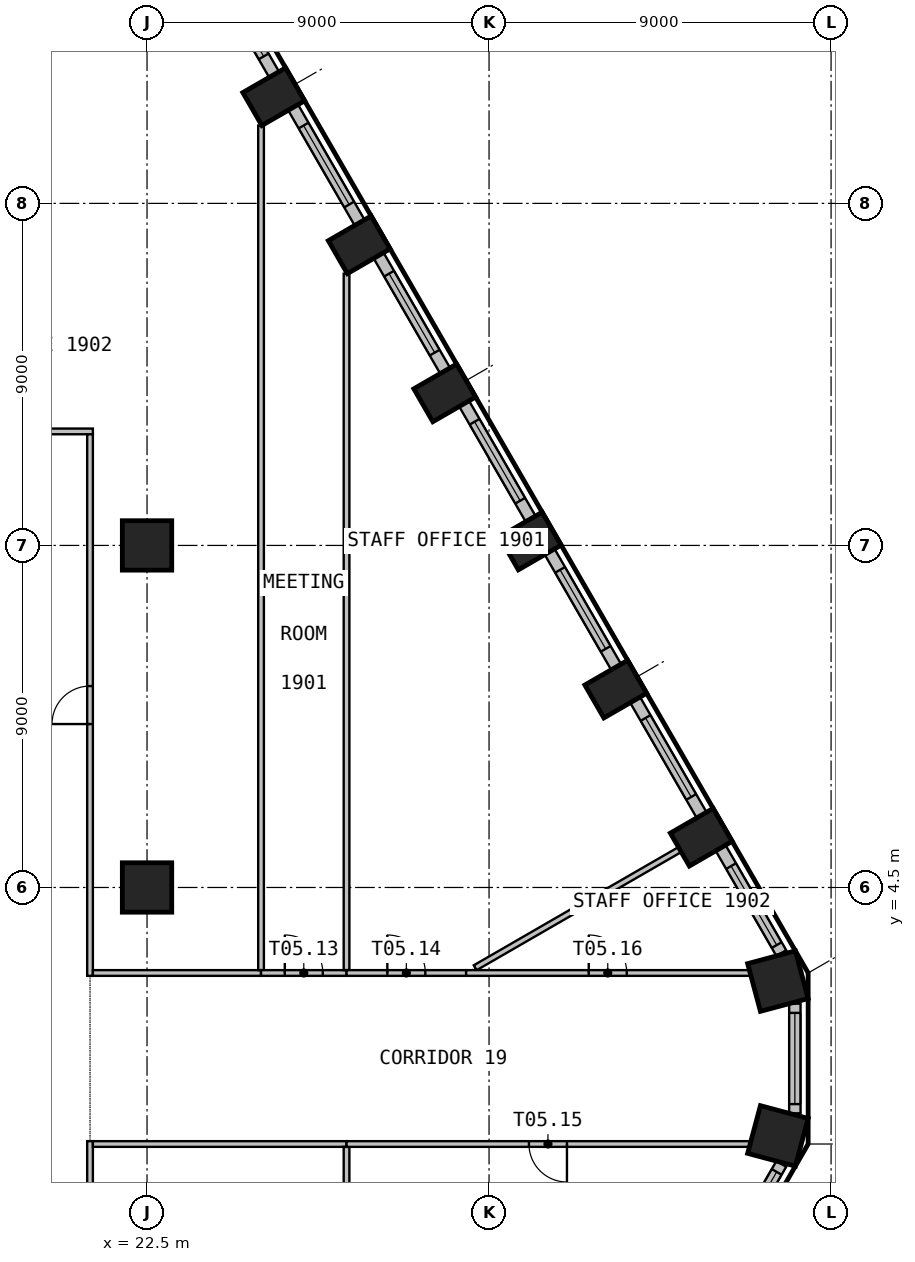
"""IFC4 building model, lengths in metres.
Left out: names, types, materials, properties, quantities, classifications, styles, units other than length and angle.
Written with IfcOpenShell. Run it as: python <this file> out.ifc"""

import sys

from ifc_helpers import new_model, si_unit, direction, frame, frame_2d, origin, origin_2d, place, context, subcontext, project, spatial, rectangle, circle, extrude, element, fill, save


model = new_model("IFC4")
c1 = context("Model", 3, precision=1e-05, world=origin(), true_north=direction((0.0, 1.0)))
c2 = subcontext(c1, "Body", "Model", "MODEL_VIEW")
j1 = project(units=[si_unit("LENGTHUNIT", "METRE"), si_unit("PLANEANGLEUNIT", "RADIAN")], contexts=[c1])
p1 = place(None, origin())
s1 = spatial("IfcSite", under=j1, at=p1, CompositionType="ELEMENT")
p2 = place(p1, origin())
s2 = spatial("IfcBuilding", under=s1, at=p2, CompositionType="ELEMENT")
p3 = place(p2, frame((0.0, 0.0, 81.3)))
s3 = spatial("IfcBuildingStorey", under=s2, at=p3, CompositionType="ELEMENT", Elevation=81.3)
for number, where, z_axis, x_axis in (
    (1, (39.101, -2.037, 0.0), (0.0, 0.0, 1.0), (0.259, 0.966, 0.0)),
    (2, (39.101, 2.037, 0.0), (0.0, 0.0, 1.0), (-0.259, 0.966, 0.0)),
):
    element("IfcColumn", number, at=place(p3, frame(where, z_axis=z_axis, x_axis=x_axis)), inside=s3, PredefinedType="COLUMN", context=c2, shape_type="SweptSolid", body=[
        extrude(rectangle(XDim=1.3, YDim=1.3, at=origin_2d()), origin(), (0.0, 0.0, 1.0), 3.525),
    ])
for number, where, z_axis, x_axis in (
    (3, (37.084, 5.822, 0.0), (0.0, 0.0, 1.0), (-0.5, 0.866, 0.0)),
    (4, (34.834, 9.719, 0.0), (0.0, 0.0, 1.0), (-0.5, 0.866, 0.0)),
    (5, (32.584, 13.616, 0.0), (0.0, 0.0, 1.0), (-0.5, 0.866, 0.0)),
    (6, (30.334, 17.513, 0.0), (0.0, 0.0, 1.0), (-0.5, 0.866, 0.0)),
    (7, (28.084, 21.411, 0.0), (0.0, 0.0, 1.0), (-0.5, 0.866, 0.0)),
    (8, (25.834, 25.308, 0.0), (0.0, 0.0, 1.0), (-0.5, 0.866, 0.0)),
):
    element("IfcColumn", number, at=place(p3, frame(where, z_axis=z_axis, x_axis=x_axis)), inside=s3, PredefinedType="COLUMN", context=c2, shape_type="SweptSolid", body=[
        extrude(rectangle(XDim=1.0, YDim=1.3, at=origin_2d()), origin(), (0.0, 0.0, 1.0), 3.525),
    ])
for number, where, z_axis, x_axis in (
    (9, (22.5, 4.5, 0.0), (0.0, 0.0, 1.0), (1.0, 0.0, 0.0)),
    (10, (22.5, 13.5, 0.0), (0.0, 0.0, 1.0), (1.0, 0.0, 0.0)),
):
    element("IfcColumn", number, at=place(p3, frame(where, z_axis=z_axis, x_axis=x_axis)), inside=s3, PredefinedType="COLUMN", context=c2, shape_type="SweptSolid", body=[
        extrude(circle(Radius=0.65, at=origin_2d()), origin(), (0.0, 0.0, 1.0), 3.525),
    ])
p4 = place(p3, frame((37.594, -5.539, 0.0), z_axis=(0.0, 0.0, 1.0), x_axis=(0.500004907028, 0.866022570692, 0.0)))
e11 = element("IfcWall", 11, at=p4, inside=s3, PredefinedType="SOLIDWALL", context=c2, shape_type="SweptSolid", body=[
    extrude(rectangle(XDim=3.192, YDim=0.3, at=frame_2d((1.596, 0.0))), origin(), (0.0, 0.0, 1.0), 3.525),
])
p5 = place(p4, frame((0.55, 0.0, 0.9)))
e12 = element("IfcOpeningElement", 12, at=p5, cuts=e11, PredefinedType="OPENING", context=c2, shape_type="SweptSolid", body=[
    extrude(rectangle(XDim=2.4, YDim=2.1, at=frame_2d((1.2, 1.05))), frame((0.0, 0.16, 0.0), z_axis=(0.0, -1.0, 0.0), x_axis=(1.0, 0.0, 0.0)), (0.0, 0.0, 1.0), 0.32),
])
p6 = place(p3, frame((39.547, -1.443, 0.0), z_axis=(0.0, 0.0, 1.0), x_axis=(0.0, 1.0, 0.0)))
e13 = element("IfcWall", 13, at=p6, inside=s3, PredefinedType="SOLIDWALL", context=c2, shape_type="SweptSolid", body=[
    extrude(rectangle(XDim=2.886, YDim=0.3, at=frame_2d((1.443, 0.0))), origin(), (0.0, 0.0, 1.0), 3.525),
])
p7 = place(p6, frame((0.243, 0.0, 0.9)))
e14 = element("IfcOpeningElement", 14, at=p7, cuts=e13, PredefinedType="OPENING", context=c2, shape_type="SweptSolid", body=[
    extrude(rectangle(XDim=2.4, YDim=2.1, at=frame_2d((1.2, 1.05))), frame((0.0, 0.16, 0.0), z_axis=(0.0, -1.0, 0.0), x_axis=(1.0, 0.0, 0.0)), (0.0, 0.0, 1.0), 0.32),
])
p8 = place(p3, frame((39.19, 2.774, 0.0), z_axis=(0.0, 0.0, 1.0), x_axis=(-0.500004907028, 0.866022570692, 0.0)))
e15 = element("IfcWall", 15, at=p8, inside=s3, PredefinedType="SOLIDWALL", context=c2, shape_type="SweptSolid", body=[
    extrude(rectangle(XDim=3.192, YDim=0.3, at=frame_2d((1.596, 0.0))), origin(), (0.0, 0.0, 1.0), 3.525),
])
p9 = place(p8, frame((0.243, 0.0, 0.9)))
e16 = element("IfcOpeningElement", 16, at=p9, cuts=e15, PredefinedType="OPENING", context=c2, shape_type="SweptSolid", body=[
    extrude(rectangle(XDim=2.4, YDim=2.1, at=frame_2d((1.2, 1.05))), frame((0.0, 0.16, 0.0), z_axis=(0.0, -1.0, 0.0), x_axis=(1.0, 0.0, 0.0)), (0.0, 0.0, 1.0), 0.32),
])
p10 = place(p3, frame((37.094, 6.406, 0.0), z_axis=(0.0, 0.0, 1.0), x_axis=(-0.499996256241, 0.866027565234, 0.0)))
e17 = element("IfcWall", 17, at=p10, inside=s3, PredefinedType="SOLIDWALL", context=c2, shape_type="SweptSolid", body=[
    extrude(rectangle(XDim=3.499, YDim=0.3, at=frame_2d((1.75, 0.0))), origin(), (0.0, 0.0, 1.0), 3.525),
])
p11 = place(p10, frame((0.55, 0.0, 0.9)))
e18 = element("IfcOpeningElement", 18, at=p11, cuts=e17, PredefinedType="OPENING", context=c2, shape_type="SweptSolid", body=[
    extrude(rectangle(XDim=2.4, YDim=2.1, at=frame_2d((1.2, 1.05))), frame((0.0, 0.16, 0.0), z_axis=(0.0, -1.0, 0.0), x_axis=(1.0, 0.0, 0.0)), (0.0, 0.0, 1.0), 0.32),
])
p12 = place(p3, frame((34.844, 10.303, 0.0), z_axis=(0.0, 0.0, 1.0), x_axis=(-0.499996256241, 0.866027565234, 0.0)))
e19 = element("IfcWall", 19, at=p12, inside=s3, PredefinedType="SOLIDWALL", context=c2, shape_type="SweptSolid", body=[
    extrude(rectangle(XDim=3.499, YDim=0.3, at=frame_2d((1.75, 0.0))), origin(), (0.0, 0.0, 1.0), 3.525),
])
p13 = place(p12, frame((0.55, 0.0, 0.9)))
e20 = element("IfcOpeningElement", 20, at=p13, cuts=e19, PredefinedType="OPENING", context=c2, shape_type="SweptSolid", body=[
    extrude(rectangle(XDim=2.4, YDim=2.1, at=frame_2d((1.2, 1.05))), frame((0.0, 0.16, 0.0), z_axis=(0.0, -1.0, 0.0), x_axis=(1.0, 0.0, 0.0)), (0.0, 0.0, 1.0), 0.32),
])
p14 = place(p3, frame((32.594, 14.2, 0.0), z_axis=(0.0, 0.0, 1.0), x_axis=(-0.499996256241, 0.866027565234, 0.0)))
e21 = element("IfcWall", 21, at=p14, inside=s3, PredefinedType="SOLIDWALL", context=c2, shape_type="SweptSolid", body=[
    extrude(rectangle(XDim=3.499, YDim=0.3, at=frame_2d((1.75, 0.0))), origin(), (0.0, 0.0, 1.0), 3.525),
])
p15 = place(p14, frame((0.55, 0.0, 0.9)))
e22 = element("IfcOpeningElement", 22, at=p15, cuts=e21, PredefinedType="OPENING", context=c2, shape_type="SweptSolid", body=[
    extrude(rectangle(XDim=2.4, YDim=2.1, at=frame_2d((1.2, 1.05))), frame((0.0, 0.16, 0.0), z_axis=(0.0, -1.0, 0.0), x_axis=(1.0, 0.0, 0.0)), (0.0, 0.0, 1.0), 0.32),
])
p16 = place(p3, frame((30.344, 18.097, 0.0), z_axis=(0.0, 0.0, 1.0), x_axis=(-0.499996256241, 0.866027565234, 0.0)))
e23 = element("IfcWall", 23, at=p16, inside=s3, PredefinedType="SOLIDWALL", context=c2, shape_type="SweptSolid", body=[
    extrude(rectangle(XDim=3.499, YDim=0.3, at=frame_2d((1.75, 0.0))), origin(), (0.0, 0.0, 1.0), 3.525),
])
p17 = place(p16, frame((0.55, 0.0, 0.9)))
e24 = element("IfcOpeningElement", 24, at=p17, cuts=e23, PredefinedType="OPENING", context=c2, shape_type="SweptSolid", body=[
    extrude(rectangle(XDim=2.4, YDim=2.1, at=frame_2d((1.2, 1.05))), frame((0.0, 0.16, 0.0), z_axis=(0.0, -1.0, 0.0), x_axis=(1.0, 0.0, 0.0)), (0.0, 0.0, 1.0), 0.32),
])
p18 = place(p3, frame((28.094, 21.994, 0.0), z_axis=(0.0, 0.0, 1.0), x_axis=(-0.499996256241, 0.866027565234, 0.0)))
e25 = element("IfcWall", 25, at=p18, inside=s3, PredefinedType="SOLIDWALL", context=c2, shape_type="SweptSolid", body=[
    extrude(rectangle(XDim=3.499, YDim=0.3, at=frame_2d((1.75, 0.0))), origin(), (0.0, 0.0, 1.0), 3.525),
])
p19 = place(p18, frame((0.55, 0.0, 0.9)))
e26 = element("IfcOpeningElement", 26, at=p19, cuts=e25, PredefinedType="OPENING", context=c2, shape_type="SweptSolid", body=[
    extrude(rectangle(XDim=2.4, YDim=2.1, at=frame_2d((1.2, 1.05))), frame((0.0, 0.16, 0.0), z_axis=(0.0, -1.0, 0.0), x_axis=(1.0, 0.0, 0.0)), (0.0, 0.0, 1.0), 0.32),
])
p20 = place(p3, frame((25.844, 25.891, 0.0), z_axis=(0.0, 0.0, 1.0), x_axis=(-0.500004907028, 0.866022570692, 0.0)))
e27 = element("IfcWall", 27, at=p20, inside=s3, PredefinedType="SOLIDWALL", context=c2, shape_type="SweptSolid", body=[
    extrude(rectangle(XDim=3.192, YDim=0.3, at=frame_2d((1.596, 0.0))), origin(), (0.0, 0.0, 1.0), 3.525),
])
p21 = place(p20, frame((0.55, 0.0, 0.9)))
e28 = element("IfcOpeningElement", 28, at=p21, cuts=e27, PredefinedType="OPENING", context=c2, shape_type="SweptSolid", body=[
    extrude(rectangle(XDim=2.4, YDim=2.1, at=frame_2d((1.2, 1.05))), frame((0.0, 0.16, 0.0), z_axis=(0.0, -1.0, 0.0), x_axis=(1.0, 0.0, 0.0)), (0.0, 0.0, 1.0), 0.32),
])
p22 = place(p3, frame((21.075, 16.5, 0.0), z_axis=(0.0, 0.0, 1.0), x_axis=(-1.0, 0.0, 0.0)))
e29 = element("IfcWall", 29, at=p22, inside=s3, PredefinedType="PARTITIONING", context=c2, shape_type="SweptSolid", body=[
    extrude(rectangle(XDim=9.825, YDim=0.15, at=frame_2d((4.913, 0.0))), origin(), (0.0, 0.0, 1.0), 3.525),
])
p23 = place(p3, frame((21.0, -16.425, 0.0), z_axis=(0.0, 0.0, 1.0), x_axis=(0.0, 1.0, 0.0)))
e30 = element("IfcWall", 30, at=p23, inside=s3, PredefinedType="PARTITIONING", context=c2, shape_type="SweptSolid", body=[
    extrude(rectangle(XDim=14.25, YDim=0.15, at=frame_2d((7.125, 0.0))), origin(), (0.0, 0.0, 1.0), 3.525),
])
p24 = place(p23, frame((6.625, 0.0, 0.0)))
e31 = element("IfcOpeningElement", 31, at=p24, cuts=e30, PredefinedType="OPENING", context=c2, shape_type="SweptSolid", body=[
    extrude(rectangle(XDim=1.0, YDim=2.1, at=frame_2d((0.5, 1.05))), frame((0.0, 0.085, 0.0), z_axis=(0.0, -1.0, 0.0), x_axis=(1.0, 0.0, 0.0)), (0.0, 0.0, 1.0), 0.17),
])
p25 = place(p3, frame((27.75, -2.25, 0.0), z_axis=(0.0, 0.0, 1.0), x_axis=(-1.0, 0.0, 0.0)))
e32 = element("IfcWall", 32, at=p25, inside=s3, PredefinedType="PARTITIONING", context=c2, shape_type="SweptSolid", body=[
    extrude(rectangle(XDim=6.675, YDim=0.15, at=frame_2d((3.337, 0.0))), origin(), (0.0, 0.0, 1.0), 3.525),
])
p26 = place(p3, frame((21.0, 2.175, 0.0), z_axis=(0.0, 0.0, 1.0), x_axis=(0.0, 1.0, 0.0)))
e33 = element("IfcWall", 33, at=p26, inside=s3, PredefinedType="PARTITIONING", context=c2, shape_type="SweptSolid", body=[
    extrude(rectangle(XDim=14.25, YDim=0.15, at=frame_2d((7.125, 0.0))), origin(), (0.0, 0.0, 1.0), 3.525),
])
p27 = place(p26, frame((6.625, 0.0, 0.0)))
e34 = element("IfcOpeningElement", 34, at=p27, cuts=e33, PredefinedType="OPENING", context=c2, shape_type="SweptSolid", body=[
    extrude(rectangle(XDim=1.0, YDim=2.1, at=frame_2d((0.5, 1.05))), frame((0.0, 0.085, 0.0), z_axis=(0.0, -1.0, 0.0), x_axis=(1.0, 0.0, 0.0)), (0.0, 0.0, 1.0), 0.17),
])
p28 = place(p3, frame((21.075, 2.25, 0.0), z_axis=(0.0, 0.0, 1.0), x_axis=(1.0, 0.0, 0.0)))
e35 = element("IfcWall", 35, at=p28, inside=s3, PredefinedType="PARTITIONING", context=c2, shape_type="SweptSolid", body=[
    extrude(rectangle(XDim=4.425, YDim=0.15, at=frame_2d((2.212, 0.0))), origin(), (0.0, 0.0, 1.0), 3.525),
])
p29 = place(p3, frame((25.5, 24.547, 0.0), z_axis=(0.0, 0.0, 1.0), x_axis=(0.0, -1.0, 0.0)))
e36 = element("IfcWall", 36, at=p29, inside=s3, PredefinedType="PARTITIONING", context=c2, shape_type="SweptSolid", body=[
    extrude(rectangle(XDim=22.222, YDim=0.15, at=frame_2d((11.111, 0.0))), origin(), (0.0, 0.0, 1.0), 3.525),
])
p30 = place(p3, frame((25.5, 2.25, 0.0), z_axis=(0.0, 0.0, 1.0), x_axis=(1.0, 0.0, 0.0)))
e37 = element("IfcWall", 37, at=p30, inside=s3, PredefinedType="PARTITIONING", context=c2, shape_type="SweptSolid", body=[
    extrude(rectangle(XDim=2.25, YDim=0.15, at=frame_2d((1.125, 0.0))), origin(), (0.0, 0.0, 1.0), 3.525),
])
p31 = place(p30, frame((0.625, 0.0, 0.0)))
e38 = element("IfcOpeningElement", 38, at=p31, cuts=e37, PredefinedType="OPENING", context=c2, shape_type="SweptSolid", body=[
    extrude(rectangle(XDim=1.0, YDim=2.1, at=frame_2d((0.5, 1.05))), frame((0.0, 0.085, 0.0), z_axis=(0.0, -1.0, 0.0), x_axis=(1.0, 0.0, 0.0)), (0.0, 0.0, 1.0), 0.17),
])
p32 = place(p3, frame((27.75, -2.325, 0.0), z_axis=(0.0, 0.0, 1.0), x_axis=(0.0, -1.0, 0.0)))
e39 = element("IfcWall", 39, at=p32, inside=s3, PredefinedType="PARTITIONING", context=c2, shape_type="SweptSolid", body=[
    extrude(rectangle(XDim=3.329, YDim=0.15, at=frame_2d((1.665, 0.0))), origin(), (0.0, 0.0, 1.0), 3.525),
])
p33 = place(p3, frame((38.35, -2.25, 0.0), z_axis=(0.0, 0.0, 1.0), x_axis=(-1.0, 0.0, 0.0)))
e40 = element("IfcWall", 40, at=p33, inside=s3, PredefinedType="PARTITIONING", context=c2, shape_type="SweptSolid", body=[
    extrude(rectangle(XDim=10.6, YDim=0.15, at=frame_2d((5.3, 0.0))), origin(), (0.0, 0.0, 1.0), 3.525),
])
p34 = place(p33, frame((4.8, 0.0, 0.0)))
e41 = element("IfcOpeningElement", 41, at=p34, cuts=e40, PredefinedType="OPENING", context=c2, shape_type="SweptSolid", body=[
    extrude(rectangle(XDim=1.0, YDim=2.1, at=frame_2d((0.5, 1.05))), frame((0.0, 0.085, 0.0), z_axis=(0.0, -1.0, 0.0), x_axis=(1.0, 0.0, 0.0)), (0.0, 0.0, 1.0), 0.17),
])
p35 = place(p3, frame((27.75, 20.649, 0.0), z_axis=(0.0, 0.0, 1.0), x_axis=(0.0, -1.0, 0.0)))
e42 = element("IfcWall", 42, at=p35, inside=s3, PredefinedType="PARTITIONING", context=c2, shape_type="SweptSolid", body=[
    extrude(rectangle(XDim=18.324, YDim=0.15, at=frame_2d((9.162, 0.0))), origin(), (0.0, 0.0, 1.0), 3.525),
])
p36 = place(p3, frame((27.75, 2.25, 0.0), z_axis=(0.0, 0.0, 1.0), x_axis=(1.0, 0.0, 0.0)))
e43 = element("IfcWall", 43, at=p36, inside=s3, PredefinedType="PARTITIONING", context=c2, shape_type="SweptSolid", body=[
    extrude(rectangle(XDim=3.147, YDim=0.15, at=frame_2d((1.573, 0.0))), origin(), (0.0, 0.0, 1.0), 3.525),
])
p37 = place(p36, frame((1.073, 0.0, 0.0)))
e44 = element("IfcOpeningElement", 44, at=p37, cuts=e43, PredefinedType="OPENING", context=c2, shape_type="SweptSolid", body=[
    extrude(rectangle(XDim=1.0, YDim=2.1, at=frame_2d((0.5, 1.05))), frame((0.0, 0.085, 0.0), z_axis=(0.0, -1.0, 0.0), x_axis=(1.0, 0.0, 0.0)), (0.0, 0.0, 1.0), 0.17),
])
p38 = place(p3, frame((36.504, 5.487, 0.0), z_axis=(0.0, 0.0, 1.0), x_axis=(-0.866007197923, -0.500031532152, 0.0)))
e45 = element("IfcWall", 45, at=p38, inside=s3, PredefinedType="PARTITIONING", context=c2, shape_type="SweptSolid", body=[
    extrude(rectangle(XDim=6.199, YDim=0.15, at=frame_2d((3.1, 0.0))), origin(), (0.0, 0.0, 1.0), 3.525),
])
p39 = place(p3, frame((30.897, 2.25, 0.0), z_axis=(0.0, 0.0, 1.0), x_axis=(1.0, 0.0, 0.0)))
e46 = element("IfcWall", 46, at=p39, inside=s3, PredefinedType="PARTITIONING", context=c2, shape_type="SweptSolid", body=[
    extrude(rectangle(XDim=7.453, YDim=0.15, at=frame_2d((3.727, 0.0))), origin(), (0.0, 0.0, 1.0), 3.525),
])
p40 = place(p39, frame((3.227, 0.0, 0.0)))
e47 = element("IfcOpeningElement", 47, at=p40, cuts=e46, PredefinedType="OPENING", context=c2, shape_type="SweptSolid", body=[
    extrude(rectangle(XDim=1.0, YDim=2.1, at=frame_2d((0.5, 1.05))), frame((0.0, 0.085, 0.0), z_axis=(0.0, -1.0, 0.0), x_axis=(1.0, 0.0, 0.0)), (0.0, 0.0, 1.0), 0.17),
])
p41 = place(p5, origin())
e48 = element("IfcWindow", 48, at=p41, inside=s3, PartitioningType="SINGLE_PANEL", PredefinedType="WINDOW", context=c2, shape_type="SweptSolid", body=[
    extrude(rectangle(XDim=2.4, YDim=2.1, at=frame_2d((1.2, 1.05))), frame((0.0, 0.03, 0.0), z_axis=(0.0, -1.0, 0.0), x_axis=(1.0, 0.0, 0.0)), (0.0, 0.0, 1.0), 0.06),
])
fill(e12, e48)
p42 = place(p7, origin())
e49 = element("IfcWindow", 49, at=p42, inside=s3, PartitioningType="SINGLE_PANEL", PredefinedType="WINDOW", context=c2, shape_type="SweptSolid", body=[
    extrude(rectangle(XDim=2.4, YDim=2.1, at=frame_2d((1.2, 1.05))), frame((0.0, 0.03, 0.0), z_axis=(0.0, -1.0, 0.0), x_axis=(1.0, 0.0, 0.0)), (0.0, 0.0, 1.0), 0.06),
])
fill(e14, e49)
p43 = place(p9, origin())
e50 = element("IfcWindow", 50, at=p43, inside=s3, PartitioningType="SINGLE_PANEL", PredefinedType="WINDOW", context=c2, shape_type="SweptSolid", body=[
    extrude(rectangle(XDim=2.4, YDim=2.1, at=frame_2d((1.2, 1.05))), frame((0.0, 0.03, 0.0), z_axis=(0.0, -1.0, 0.0), x_axis=(1.0, 0.0, 0.0)), (0.0, 0.0, 1.0), 0.06),
])
fill(e16, e50)
p44 = place(p11, origin())
e51 = element("IfcWindow", 51, at=p44, inside=s3, PartitioningType="SINGLE_PANEL", PredefinedType="WINDOW", context=c2, shape_type="SweptSolid", body=[
    extrude(rectangle(XDim=2.4, YDim=2.1, at=frame_2d((1.2, 1.05))), frame((0.0, 0.03, 0.0), z_axis=(0.0, -1.0, 0.0), x_axis=(1.0, 0.0, 0.0)), (0.0, 0.0, 1.0), 0.06),
])
fill(e18, e51)
p45 = place(p13, origin())
e52 = element("IfcWindow", 52, at=p45, inside=s3, PartitioningType="SINGLE_PANEL", PredefinedType="WINDOW", context=c2, shape_type="SweptSolid", body=[
    extrude(rectangle(XDim=2.4, YDim=2.1, at=frame_2d((1.2, 1.05))), frame((0.0, 0.03, 0.0), z_axis=(0.0, -1.0, 0.0), x_axis=(1.0, 0.0, 0.0)), (0.0, 0.0, 1.0), 0.06),
])
fill(e20, e52)
p46 = place(p15, origin())
e53 = element("IfcWindow", 53, at=p46, inside=s3, PartitioningType="SINGLE_PANEL", PredefinedType="WINDOW", context=c2, shape_type="SweptSolid", body=[
    extrude(rectangle(XDim=2.4, YDim=2.1, at=frame_2d((1.2, 1.05))), frame((0.0, 0.03, 0.0), z_axis=(0.0, -1.0, 0.0), x_axis=(1.0, 0.0, 0.0)), (0.0, 0.0, 1.0), 0.06),
])
fill(e22, e53)
p47 = place(p17, origin())
e54 = element("IfcWindow", 54, at=p47, inside=s3, PartitioningType="SINGLE_PANEL", PredefinedType="WINDOW", context=c2, shape_type="SweptSolid", body=[
    extrude(rectangle(XDim=2.4, YDim=2.1, at=frame_2d((1.2, 1.05))), frame((0.0, 0.03, 0.0), z_axis=(0.0, -1.0, 0.0), x_axis=(1.0, 0.0, 0.0)), (0.0, 0.0, 1.0), 0.06),
])
fill(e24, e54)
p48 = place(p19, origin())
e55 = element("IfcWindow", 55, at=p48, inside=s3, PartitioningType="SINGLE_PANEL", PredefinedType="WINDOW", context=c2, shape_type="SweptSolid", body=[
    extrude(rectangle(XDim=2.4, YDim=2.1, at=frame_2d((1.2, 1.05))), frame((0.0, 0.03, 0.0), z_axis=(0.0, -1.0, 0.0), x_axis=(1.0, 0.0, 0.0)), (0.0, 0.0, 1.0), 0.06),
])
fill(e26, e55)
p49 = place(p21, origin())
e56 = element("IfcWindow", 56, at=p49, inside=s3, PartitioningType="SINGLE_PANEL", PredefinedType="WINDOW", context=c2, shape_type="SweptSolid", body=[
    extrude(rectangle(XDim=2.4, YDim=2.1, at=frame_2d((1.2, 1.05))), frame((0.0, 0.03, 0.0), z_axis=(0.0, -1.0, 0.0), x_axis=(1.0, 0.0, 0.0)), (0.0, 0.0, 1.0), 0.06),
])
fill(e28, e56)
p50 = place(p27, origin())
e57 = element("IfcDoor", 57, at=p50, inside=s3, OperationType="SINGLE_SWING_RIGHT", PredefinedType="DOOR", context=c2, shape_type="SweptSolid", body=[
    extrude(rectangle(XDim=1.0, YDim=2.1, at=frame_2d((0.5, 1.05))), frame((0.0, 0.025, 0.0), z_axis=(0.0, -1.0, 0.0), x_axis=(1.0, 0.0, 0.0)), (0.0, 0.0, 1.0), 0.05),
])
fill(e34, e57)
p51 = place(p31, origin())
e58 = element("IfcDoor", 58, at=p51, inside=s3, OperationType="SINGLE_SWING_LEFT", PredefinedType="DOOR", context=c2, shape_type="SweptSolid", body=[
    extrude(rectangle(XDim=1.0, YDim=2.1, at=frame_2d((0.5, 1.05))), frame((0.0, 0.025, 0.0), z_axis=(0.0, -1.0, 0.0), x_axis=(1.0, 0.0, 0.0)), (0.0, 0.0, 1.0), 0.05),
])
fill(e38, e58)
p52 = place(p37, origin())
e59 = element("IfcDoor", 59, at=p52, inside=s3, OperationType="SINGLE_SWING_RIGHT", PredefinedType="DOOR", context=c2, shape_type="SweptSolid", body=[
    extrude(rectangle(XDim=1.0, YDim=2.1, at=frame_2d((0.5, 1.05))), frame((0.0, 0.025, 0.0), z_axis=(0.0, -1.0, 0.0), x_axis=(1.0, 0.0, 0.0)), (0.0, 0.0, 1.0), 0.05),
])
fill(e44, e59)
p53 = place(p34, origin())
e60 = element("IfcDoor", 60, at=p53, inside=s3, OperationType="SINGLE_SWING_LEFT", PredefinedType="DOOR", context=c2, shape_type="SweptSolid", body=[
    extrude(rectangle(XDim=1.0, YDim=2.1, at=frame_2d((0.5, 1.05))), frame((0.0, 0.025, 0.0), z_axis=(0.0, -1.0, 0.0), x_axis=(1.0, 0.0, 0.0)), (0.0, 0.0, 1.0), 0.05),
])
fill(e41, e60)
p54 = place(p40, origin())
e61 = element("IfcDoor", 61, at=p54, inside=s3, OperationType="SINGLE_SWING_RIGHT", PredefinedType="DOOR", context=c2, shape_type="SweptSolid", body=[
    extrude(rectangle(XDim=1.0, YDim=2.1, at=frame_2d((0.5, 1.05))), frame((0.0, 0.025, 0.0), z_axis=(0.0, -1.0, 0.0), x_axis=(1.0, 0.0, 0.0)), (0.0, 0.0, 1.0), 0.05),
])
fill(e47, e61)
save(model, sys.argv[1])
